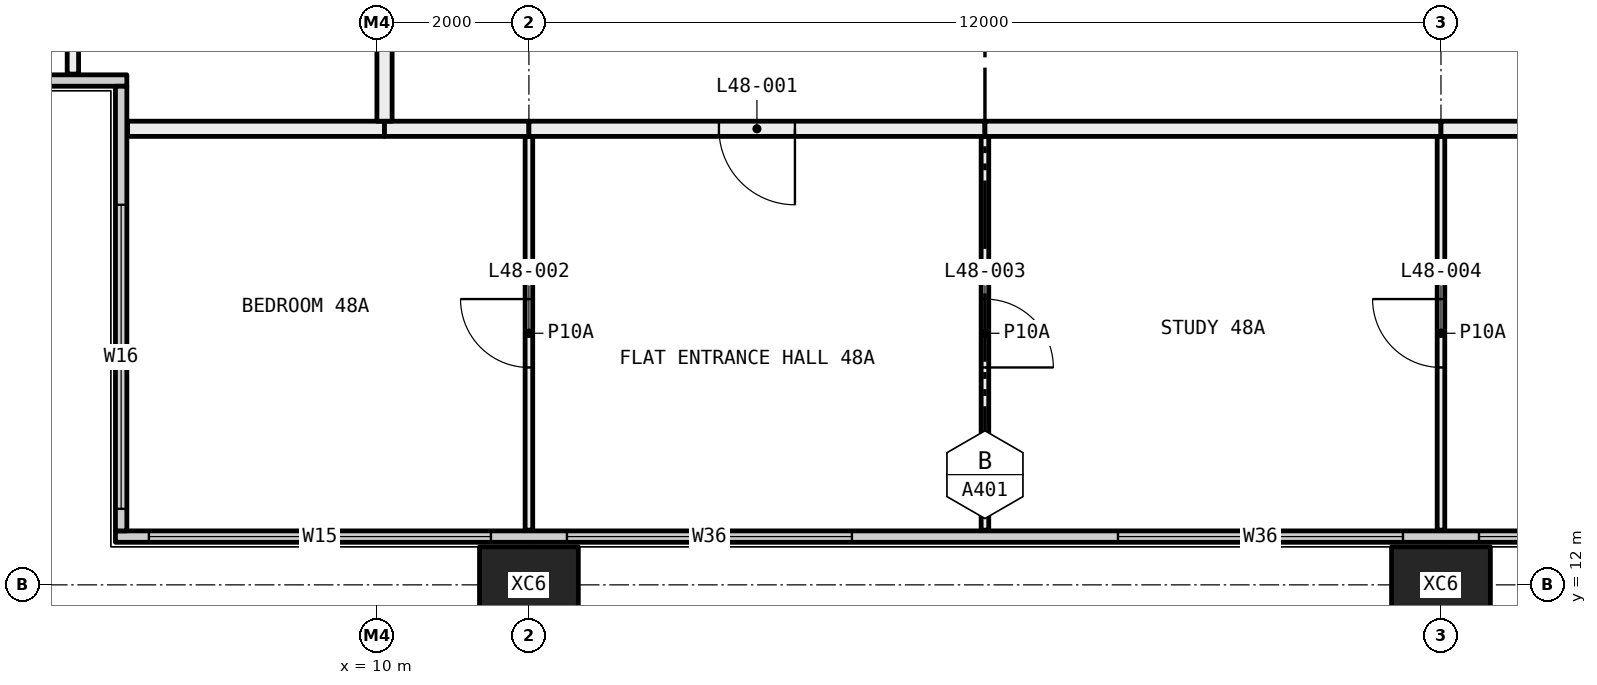
"""IFC4 building model, lengths in metres.
Left out: names, types, materials, properties, quantities, classifications, styles, units other than length and angle.
Written with IfcOpenShell. Run it as: python <this file> out.ifc"""

import sys

from ifc_helpers import new_model, si_unit, direction, frame, frame_2d, origin, origin_2d, place, context, subcontext, project, spatial, rectangle, hollow_rectangle, extrude, element, fill, save


model = new_model("IFC4")
c1 = context("Model", 3, precision=1e-05, world=origin(), true_north=direction((0.0, 1.0)))
c2 = subcontext(c1, "Body", "Model", "MODEL_VIEW")
j1 = project(units=[si_unit("LENGTHUNIT", "METRE"), si_unit("PLANEANGLEUNIT", "RADIAN")], contexts=[c1])
p1 = place(None, origin())
s1 = spatial("IfcSite", under=j1, at=p1, CompositionType="ELEMENT")
p2 = place(p1, origin())
s2 = spatial("IfcBuilding", under=s1, at=p2, CompositionType="ELEMENT")
p3 = place(p2, frame((0.0, 0.0, 182.4)))
s3 = spatial("IfcBuildingStorey", under=s2, at=p3, CompositionType="ELEMENT", Elevation=182.4)
for number, where, z_axis, x_axis in (
    (1, (12.0, 12.0, -0.4), (0.0, 0.0, 1.0), (1.0, 0.0, 0.0)),
    (2, (24.0, 12.0, -0.4), (0.0, 0.0, 1.0), (1.0, 0.0, 0.0)),
):
    element("IfcColumn", number, at=place(p3, frame(where, z_axis=z_axis, x_axis=x_axis)), inside=s3, PredefinedType="COLUMN", context=c2, shape_type="SweptSolid", body=[
        extrude(hollow_rectangle(XDim=1.3, YDim=1.0, WallThickness=0.05, at=origin_2d()), origin(), (0.0, 0.0, 1.0), 3.45),
    ])
p4 = place(p3, frame((6.56, 12.635, 0.0), z_axis=(0.0, 0.0, 1.0), x_axis=(1.0, 0.0, 0.0)))
e3 = element("IfcWall", 3, at=p4, inside=s3, PredefinedType="ELEMENTEDWALL", context=c2, shape_type="SweptSolid", body=[
    extrude(rectangle(XDim=46.88, YDim=0.15, at=frame_2d((23.44, 0.0))), origin(), (0.0, 0.0, 1.0), 3.05),
])
p5 = place(p4, frame((0.44, 0.0, 0.45)))
e4 = element("IfcOpeningElement", 4, at=p5, cuts=e3, PredefinedType="OPENING", context=c2, shape_type="SweptSolid", body=[
    extrude(rectangle(XDim=4.5, YDim=2.55, at=frame_2d((2.25, 1.275))), frame((0.0, 0.085, 0.0), z_axis=(0.0, -1.0, 0.0), x_axis=(1.0, 0.0, 0.0)), (0.0, 0.0, 1.0), 0.17),
])
p6 = place(p4, frame((5.94, 0.0, 0.45)))
e5 = element("IfcOpeningElement", 5, at=p6, cuts=e3, PredefinedType="OPENING", context=c2, shape_type="SweptSolid", body=[
    extrude(rectangle(XDim=3.75, YDim=2.55, at=frame_2d((1.875, 1.275))), frame((0.0, 0.085, 0.0), z_axis=(0.0, -1.0, 0.0), x_axis=(1.0, 0.0, 0.0)), (0.0, 0.0, 1.0), 0.17),
])
p7 = place(p4, frame((13.19, 0.0, 0.45)))
e6 = element("IfcOpeningElement", 6, at=p7, cuts=e3, PredefinedType="OPENING", context=c2, shape_type="SweptSolid", body=[
    extrude(rectangle(XDim=3.75, YDim=2.55, at=frame_2d((1.875, 1.275))), frame((0.0, 0.085, 0.0), z_axis=(0.0, -1.0, 0.0), x_axis=(1.0, 0.0, 0.0)), (0.0, 0.0, 1.0), 0.17),
])
p8 = place(p4, frame((17.94, 0.0, 0.45)))
e7 = element("IfcOpeningElement", 7, at=p8, cuts=e3, PredefinedType="OPENING", context=c2, shape_type="SweptSolid", body=[
    extrude(rectangle(XDim=3.75, YDim=2.55, at=frame_2d((1.875, 1.275))), frame((0.0, 0.085, 0.0), z_axis=(0.0, -1.0, 0.0), x_axis=(1.0, 0.0, 0.0)), (0.0, 0.0, 1.0), 0.17),
])
p9 = place(p4, frame((25.19, 0.0, 0.45)))
e8 = element("IfcOpeningElement", 8, at=p9, cuts=e3, PredefinedType="OPENING", context=c2, shape_type="SweptSolid", body=[
    extrude(rectangle(XDim=0.75, YDim=2.55, at=frame_2d((0.375, 1.275))), frame((0.0, 0.085, 0.0), z_axis=(0.0, -1.0, 0.0), x_axis=(1.0, 0.0, 0.0)), (0.0, 0.0, 1.0), 0.17),
])
p10 = place(p4, frame((26.94, 0.0, 0.45)))
e9 = element("IfcOpeningElement", 9, at=p10, cuts=e3, PredefinedType="OPENING", context=c2, shape_type="SweptSolid", body=[
    extrude(rectangle(XDim=2.0, YDim=2.55, at=frame_2d((1.0, 1.275))), frame((0.0, 0.085, 0.0), z_axis=(0.0, -1.0, 0.0), x_axis=(1.0, 0.0, 0.0)), (0.0, 0.0, 1.0), 0.17),
])
p11 = place(p4, frame((29.94, 0.0, 0.45)))
e10 = element("IfcOpeningElement", 10, at=p11, cuts=e3, PredefinedType="OPENING", context=c2, shape_type="SweptSolid", body=[
    extrude(rectangle(XDim=3.75, YDim=2.55, at=frame_2d((1.875, 1.275))), frame((0.0, 0.085, 0.0), z_axis=(0.0, -1.0, 0.0), x_axis=(1.0, 0.0, 0.0)), (0.0, 0.0, 1.0), 0.17),
])
p12 = place(p4, frame((37.19, 0.0, 0.45)))
e11 = element("IfcOpeningElement", 11, at=p12, cuts=e3, PredefinedType="OPENING", context=c2, shape_type="SweptSolid", body=[
    extrude(rectangle(XDim=3.75, YDim=2.55, at=frame_2d((1.875, 1.275))), frame((0.0, 0.085, 0.0), z_axis=(0.0, -1.0, 0.0), x_axis=(1.0, 0.0, 0.0)), (0.0, 0.0, 1.0), 0.17),
])
p13 = place(p4, frame((41.94, 0.0, 0.45)))
e12 = element("IfcOpeningElement", 12, at=p13, cuts=e3, PredefinedType="OPENING", context=c2, shape_type="SweptSolid", body=[
    extrude(rectangle(XDim=4.5, YDim=2.55, at=frame_2d((2.25, 1.275))), frame((0.0, 0.085, 0.0), z_axis=(0.0, -1.0, 0.0), x_axis=(1.0, 0.0, 0.0)), (0.0, 0.0, 1.0), 0.17),
])
p14 = place(p3, frame((0.56, 18.635, 0.0), z_axis=(0.0, 0.0, 1.0), x_axis=(1.0, 0.0, 0.0)))
e13 = element("IfcWall", 13, at=p14, inside=s3, PredefinedType="ELEMENTEDWALL", context=c2, shape_type="SweptSolid", body=[
    extrude(rectangle(XDim=6.15, YDim=0.15, at=frame_2d((3.075, 0.0))), origin(), (0.0, 0.0, 1.0), 3.05),
])
p15 = place(p14, frame((0.44, 0.0, 0.45)))
e14 = element("IfcOpeningElement", 14, at=p15, cuts=e13, PredefinedType="OPENING", context=c2, shape_type="SweptSolid", body=[
    extrude(rectangle(XDim=4.0, YDim=2.55, at=frame_2d((2.0, 1.275))), frame((0.0, 0.085, 0.0), z_axis=(0.0, -1.0, 0.0), x_axis=(1.0, 0.0, 0.0)), (0.0, 0.0, 1.0), 0.17),
])
p16 = place(p3, frame((6.635, 12.71, 0.0), z_axis=(0.0, 0.0, 1.0), x_axis=(0.0, 1.0, 0.0)))
e15 = element("IfcWall", 15, at=p16, inside=s3, PredefinedType="ELEMENTEDWALL", context=c2, shape_type="SweptSolid", body=[
    extrude(rectangle(XDim=5.85, YDim=0.15, at=frame_2d((2.925, 0.0))), origin(), (0.0, 0.0, 1.0), 3.05),
])
p17 = place(p16, frame((0.29, 0.0, 0.45)))
e16 = element("IfcOpeningElement", 16, at=p17, cuts=e15, PredefinedType="OPENING", context=c2, shape_type="SweptSolid", body=[
    extrude(rectangle(XDim=4.0, YDim=2.55, at=frame_2d((2.0, 1.275))), frame((0.0, 0.085, 0.0), z_axis=(0.0, -1.0, 0.0), x_axis=(1.0, 0.0, 0.0)), (0.0, 0.0, 1.0), 0.17),
])
p18 = place(p3, frame((12.0, 12.72, 0.0), z_axis=(0.0, 0.0, 1.0), x_axis=(0.0, 1.0, 0.0)))
e17 = element("IfcWall", 17, at=p18, inside=s3, PredefinedType="PARTITIONING", context=c2, shape_type="SweptSolid", body=[
    extrude(rectangle(XDim=5.18, YDim=0.1, at=frame_2d((2.59, 0.0))), origin(), (0.0, 0.0, 1.0), 3.05),
])
p19 = place(p18, frame((2.14, 0.0, 0.0)))
e18 = element("IfcOpeningElement", 18, at=p19, cuts=e17, PredefinedType="OPENING", context=c2, shape_type="SweptSolid", body=[
    extrude(rectangle(XDim=0.9, YDim=2.1, at=frame_2d((0.45, 1.05))), frame((0.0, 0.06, 0.0), z_axis=(0.0, -1.0, 0.0), x_axis=(1.0, 0.0, 0.0)), (0.0, 0.0, 1.0), 0.12),
])
p20 = place(p3, frame((10.1, 18.0, 0.0), z_axis=(0.0, 0.0, 1.0), x_axis=(-1.0, 0.0, 0.0)))
e19 = element("IfcWall", 19, at=p20, inside=s3, PredefinedType="PARTITIONING", context=c2, shape_type="SweptSolid", body=[
    extrude(rectangle(XDim=3.38, YDim=0.2, at=frame_2d((1.69, 0.0))), origin(), (0.0, 0.0, 1.0), 3.05),
])
p21 = place(p3, frame((12.0, 18.0, 0.0), z_axis=(0.0, 0.0, 1.0), x_axis=(-1.0, 0.0, 0.0)))
e20 = element("IfcWall", 20, at=p21, inside=s3, PredefinedType="PARTITIONING", context=c2, shape_type="SweptSolid", body=[
    extrude(rectangle(XDim=1.9, YDim=0.2, at=frame_2d((0.95, 0.0))), origin(), (0.0, 0.0, 1.0), 3.05),
])
p22 = place(p3, frame((18.0, 12.72, 0.0), z_axis=(0.0, 0.0, 1.0), x_axis=(0.0, 1.0, 0.0)))
e21 = element("IfcWall", 21, at=p22, inside=s3, PredefinedType="PARTITIONING", context=c2, shape_type="SweptSolid", body=[
    extrude(rectangle(XDim=5.18, YDim=0.1, at=frame_2d((2.59, 0.0))), origin(), (0.0, 0.0, 1.0), 3.05),
])
p23 = place(p22, frame((2.14, 0.0, 0.0)))
e22 = element("IfcOpeningElement", 22, at=p23, cuts=e21, PredefinedType="OPENING", context=c2, shape_type="SweptSolid", body=[
    extrude(rectangle(XDim=0.9, YDim=2.1, at=frame_2d((0.45, 1.05))), frame((0.0, 0.06, 0.0), z_axis=(0.0, -1.0, 0.0), x_axis=(1.0, 0.0, 0.0)), (0.0, 0.0, 1.0), 0.12),
])
p24 = place(p3, frame((18.0, 18.0, 0.0), z_axis=(0.0, 0.0, 1.0), x_axis=(-1.0, 0.0, 0.0)))
e23 = element("IfcWall", 23, at=p24, inside=s3, PredefinedType="PARTITIONING", context=c2, shape_type="SweptSolid", body=[
    extrude(rectangle(XDim=6.0, YDim=0.2, at=frame_2d((3.0, 0.0))), origin(), (0.0, 0.0, 1.0), 3.05),
])
p25 = place(p24, frame((2.5, 0.0, 0.0)))
e24 = element("IfcOpeningElement", 24, at=p25, cuts=e23, PredefinedType="OPENING", context=c2, shape_type="SweptSolid", body=[
    extrude(rectangle(XDim=1.0, YDim=2.1, at=frame_2d((0.5, 1.05))), frame((0.0, 0.11, 0.0), z_axis=(0.0, -1.0, 0.0), x_axis=(1.0, 0.0, 0.0)), (0.0, 0.0, 1.0), 0.22),
])
p26 = place(p3, frame((24.0, 12.72, 0.0), z_axis=(0.0, 0.0, 1.0), x_axis=(0.0, 1.0, 0.0)))
e25 = element("IfcWall", 25, at=p26, inside=s3, PredefinedType="PARTITIONING", context=c2, shape_type="SweptSolid", body=[
    extrude(rectangle(XDim=5.18, YDim=0.1, at=frame_2d((2.59, 0.0))), origin(), (0.0, 0.0, 1.0), 3.05),
])
p27 = place(p26, frame((2.14, 0.0, 0.0)))
e26 = element("IfcOpeningElement", 26, at=p27, cuts=e25, PredefinedType="OPENING", context=c2, shape_type="SweptSolid", body=[
    extrude(rectangle(XDim=0.9, YDim=2.1, at=frame_2d((0.45, 1.05))), frame((0.0, 0.06, 0.0), z_axis=(0.0, -1.0, 0.0), x_axis=(1.0, 0.0, 0.0)), (0.0, 0.0, 1.0), 0.12),
])
p28 = place(p3, frame((24.0, 18.0, 0.0), z_axis=(0.0, 0.0, 1.0), x_axis=(-1.0, 0.0, 0.0)))
e27 = element("IfcWall", 27, at=p28, inside=s3, PredefinedType="PARTITIONING", context=c2, shape_type="SweptSolid", body=[
    extrude(rectangle(XDim=6.0, YDim=0.2, at=frame_2d((3.0, 0.0))), origin(), (0.0, 0.0, 1.0), 3.05),
])
p29 = place(p3, frame((25.9, 18.0, 0.0), z_axis=(0.0, 0.0, 1.0), x_axis=(-1.0, 0.0, 0.0)))
e28 = element("IfcWall", 28, at=p29, inside=s3, PredefinedType="PARTITIONING", context=c2, shape_type="SweptSolid", body=[
    extrude(rectangle(XDim=1.9, YDim=0.2, at=frame_2d((0.95, 0.0))), origin(), (0.0, 0.0, 1.0), 3.05),
])
p30 = place(p3, frame((6.0, 18.72, 0.0), z_axis=(0.0, 0.0, 1.0), x_axis=(0.0, 1.0, 0.0)))
e29 = element("IfcWall", 29, at=p30, inside=s3, PredefinedType="PARTITIONING", context=c2, shape_type="SweptSolid", body=[
    extrude(rectangle(XDim=2.28, YDim=0.15, at=frame_2d((1.14, 0.0))), origin(), (0.0, 0.0, 1.0), 3.05),
])
p31 = place(p3, frame((10.1, 18.1, 0.0), z_axis=(0.0, 0.0, 1.0), x_axis=(0.0, 1.0, 0.0)))
e30 = element("IfcWall", 30, at=p31, inside=s3, PredefinedType="PARTITIONING", context=c2, shape_type="SweptSolid", body=[
    extrude(rectangle(XDim=2.9, YDim=0.2, at=frame_2d((1.45, 0.0))), origin(), (0.0, 0.0, 1.0), 3.05),
])
p32 = place(p5, origin())
e31 = element("IfcWindow", 31, at=p32, inside=s3, PartitioningType="SINGLE_PANEL", PredefinedType="WINDOW", context=c2, shape_type="SweptSolid", body=[
    extrude(rectangle(XDim=4.5, YDim=2.55, at=frame_2d((2.25, 1.275))), frame((0.0, 0.03, 0.0), z_axis=(0.0, -1.0, 0.0), x_axis=(1.0, 0.0, 0.0)), (0.0, 0.0, 1.0), 0.06),
])
fill(e4, e31)
p33 = place(p6, origin())
e32 = element("IfcWindow", 32, at=p33, inside=s3, PartitioningType="SINGLE_PANEL", PredefinedType="WINDOW", context=c2, shape_type="SweptSolid", body=[
    extrude(rectangle(XDim=3.75, YDim=2.55, at=frame_2d((1.875, 1.275))), frame((0.0, 0.03, 0.0), z_axis=(0.0, -1.0, 0.0), x_axis=(1.0, 0.0, 0.0)), (0.0, 0.0, 1.0), 0.06),
])
fill(e5, e32)
p34 = place(p7, origin())
e33 = element("IfcWindow", 33, at=p34, inside=s3, PartitioningType="SINGLE_PANEL", PredefinedType="WINDOW", context=c2, shape_type="SweptSolid", body=[
    extrude(rectangle(XDim=3.75, YDim=2.55, at=frame_2d((1.875, 1.275))), frame((0.0, 0.03, 0.0), z_axis=(0.0, -1.0, 0.0), x_axis=(1.0, 0.0, 0.0)), (0.0, 0.0, 1.0), 0.06),
])
fill(e6, e33)
p35 = place(p8, origin())
e34 = element("IfcWindow", 34, at=p35, inside=s3, PartitioningType="SINGLE_PANEL", PredefinedType="WINDOW", context=c2, shape_type="SweptSolid", body=[
    extrude(rectangle(XDim=3.75, YDim=2.55, at=frame_2d((1.875, 1.275))), frame((0.0, 0.03, 0.0), z_axis=(0.0, -1.0, 0.0), x_axis=(1.0, 0.0, 0.0)), (0.0, 0.0, 1.0), 0.06),
])
fill(e7, e34)
p36 = place(p17, origin())
e35 = element("IfcWindow", 35, at=p36, inside=s3, PartitioningType="SINGLE_PANEL", PredefinedType="WINDOW", context=c2, shape_type="SweptSolid", body=[
    extrude(rectangle(XDim=4.0, YDim=2.55, at=frame_2d((2.0, 1.275))), frame((0.0, 0.03, 0.0), z_axis=(0.0, -1.0, 0.0), x_axis=(1.0, 0.0, 0.0)), (0.0, 0.0, 1.0), 0.06),
])
fill(e16, e35)
p37 = place(p25, origin())
e36 = element("IfcDoor", 36, at=p37, inside=s3, OperationType="SINGLE_SWING_RIGHT", PredefinedType="DOOR", context=c2, shape_type="SweptSolid", body=[
    extrude(rectangle(XDim=1.0, YDim=2.1, at=frame_2d((0.5, 1.05))), frame((0.0, 0.025, 0.0), z_axis=(0.0, -1.0, 0.0), x_axis=(1.0, 0.0, 0.0)), (0.0, 0.0, 1.0), 0.05),
])
fill(e24, e36)
p38 = place(p19, origin())
e37 = element("IfcDoor", 37, at=p38, inside=s3, OperationType="SINGLE_SWING_LEFT", PredefinedType="DOOR", context=c2, shape_type="SweptSolid", body=[
    extrude(rectangle(XDim=0.9, YDim=2.1, at=frame_2d((0.45, 1.05))), frame((0.0, 0.025, 0.0), z_axis=(0.0, -1.0, 0.0), x_axis=(1.0, 0.0, 0.0)), (0.0, 0.0, 1.0), 0.05),
])
fill(e18, e37)
p39 = place(p23, frame((0.9, 0.0, 0.0), x_axis=(-1.0, 0.0, 0.0)))
e38 = element("IfcDoor", 38, at=p39, inside=s3, OperationType="SINGLE_SWING_LEFT", PredefinedType="DOOR", context=c2, shape_type="SweptSolid", body=[
    extrude(rectangle(XDim=0.9, YDim=2.1, at=frame_2d((0.45, 1.05))), frame((0.0, 0.025, 0.0), z_axis=(0.0, -1.0, 0.0), x_axis=(1.0, 0.0, 0.0)), (0.0, 0.0, 1.0), 0.05),
])
fill(e22, e38)
p40 = place(p27, origin())
e39 = element("IfcDoor", 39, at=p40, inside=s3, OperationType="SINGLE_SWING_LEFT", PredefinedType="DOOR", context=c2, shape_type="SweptSolid", body=[
    extrude(rectangle(XDim=0.9, YDim=2.1, at=frame_2d((0.45, 1.05))), frame((0.0, 0.025, 0.0), z_axis=(0.0, -1.0, 0.0), x_axis=(1.0, 0.0, 0.0)), (0.0, 0.0, 1.0), 0.05),
])
fill(e26, e39)
save(model, sys.argv[1])
